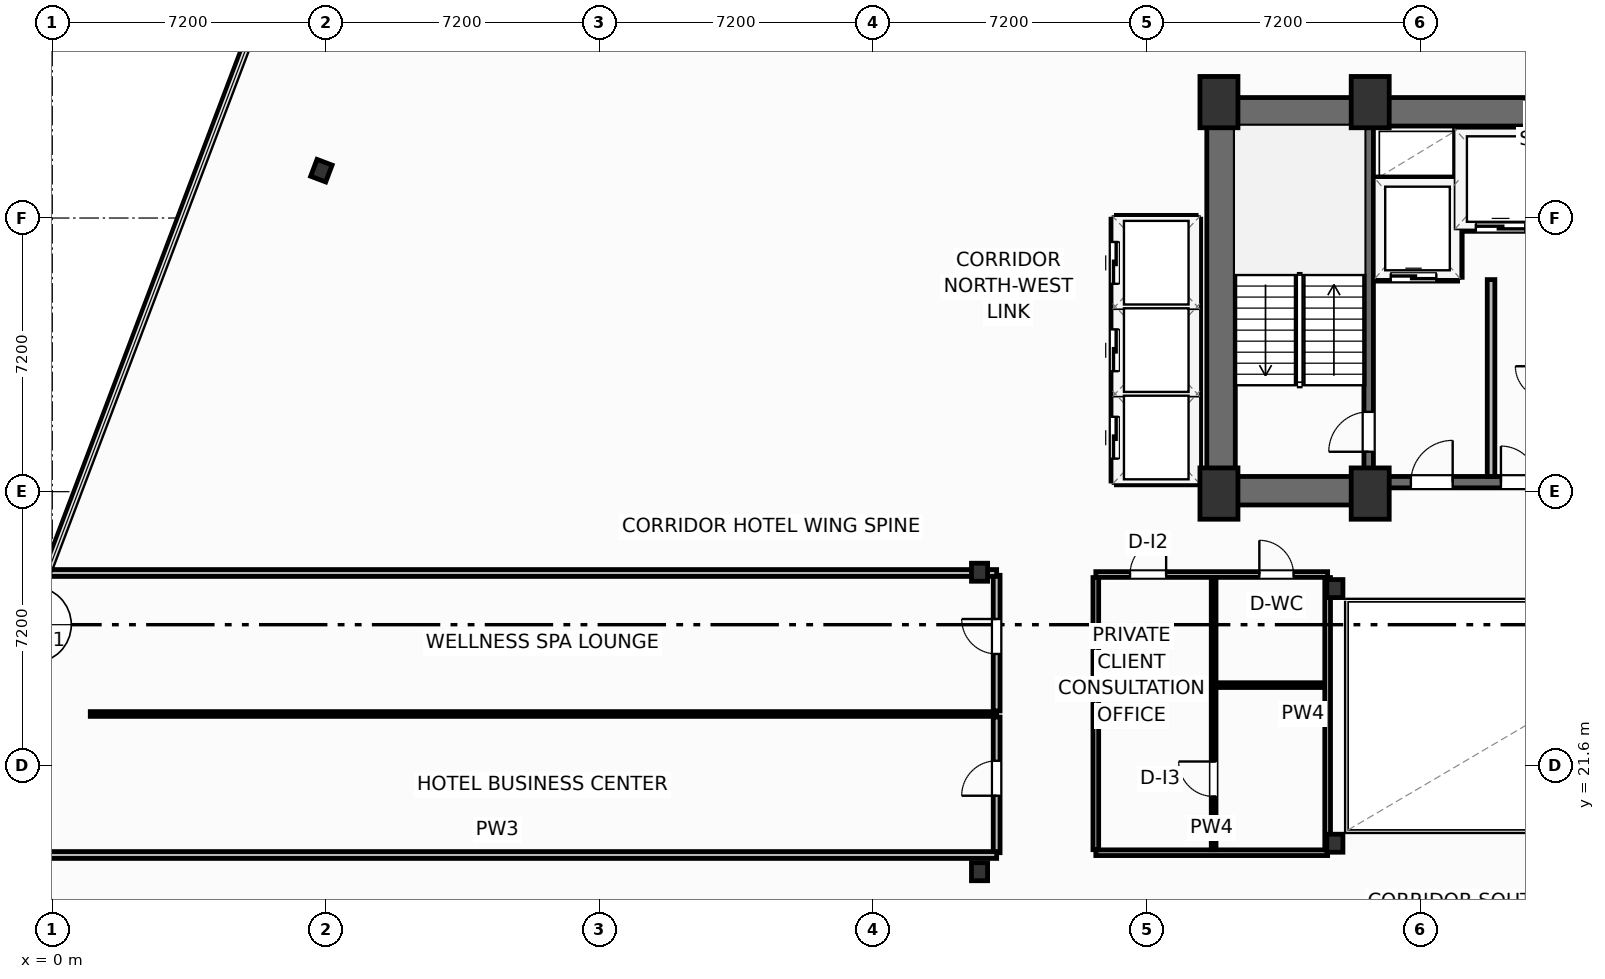
"""IFC4 building model, lengths in metres.
Left out: names, types, materials, properties, quantities, classifications, styles, units other than length and angle.
Written with IfcOpenShell. Run it as: python <this file> out.ifc"""

import sys

from ifc_helpers import new_model, si_unit, direction, frame, frame_2d, origin, origin_2d, place, context, subcontext, project, spatial, rectangle, i_section, extrude, element, fill, save


model = new_model("IFC4")
c1 = context("Model", 3, precision=1e-05, world=origin(), true_north=direction((0.0, 1.0)))
c2 = subcontext(c1, "Body", "Model", "MODEL_VIEW")
j1 = project(units=[si_unit("LENGTHUNIT", "METRE"), si_unit("PLANEANGLEUNIT", "RADIAN")], contexts=[c1])
p1 = place(None, origin())
s1 = spatial("IfcSite", under=j1, at=p1, CompositionType="ELEMENT")
p2 = place(p1, origin())
s2 = spatial("IfcBuilding", under=s1, at=p2, CompositionType="ELEMENT")
p3 = place(p2, frame((0.0, 0.0, 76.2)))
s3 = spatial("IfcBuildingStorey", under=s2, at=p3, CompositionType="ELEMENT", Elevation=76.2)
for number, where, z_axis, x_axis in (
    (1, (30.7, 28.75, 0.0), (0.0, 0.0, 1.0), (1.0, 0.0, 0.0)),
    (2, (34.68, 28.75, 0.0), (0.0, 0.0, 1.0), (1.0, 0.0, 0.0)),
    (3, (30.7, 39.05, 0.0), (0.0, 0.0, 1.0), (1.0, 0.0, 0.0)),
    (4, (34.68, 39.05, 0.0), (0.0, 0.0, 1.0), (1.0, 0.0, 0.0)),
):
    element("IfcColumn", number, at=place(p3, frame(where, z_axis=z_axis, x_axis=x_axis)), inside=s3, PredefinedType="COLUMN", context=c2, shape_type="SweptSolid", body=[
        extrude(rectangle(XDim=1.0, YDim=1.35, at=origin_2d()), origin(), (0.0, 0.0, 1.0), 3.7),
    ])
for number, where, z_axis, x_axis in (
    (5, (33.75, 19.55, 0.0), (0.0, 0.0, 1.0), (1.0, 0.0, 0.0)),
    (6, (33.75, 26.25, 0.0), (0.0, 0.0, 1.0), (1.0, 0.0, 0.0)),
    (7, (24.4, 18.8, 0.0), (0.0, 0.0, 1.0), (1.0, 0.0, 0.0)),
    (8, (24.4, 26.68, 0.0), (0.0, 0.0, 1.0), (1.0, 0.0, 0.0)),
):
    element("IfcColumn", number, at=place(p3, frame(where, z_axis=z_axis, x_axis=x_axis)), inside=s3, PredefinedType="COLUMN", context=c2, shape_type="SweptSolid", body=[
        extrude(i_section(OverallWidth=0.424, OverallDepth=0.474, WebThickness=0.048, FlangeThickness=0.077, FilletRadius=0.025, at=origin_2d()), origin(), (0.0, 0.0, 1.0), 3.7),
    ])
p4 = place(p3, frame((30.38, 38.795, 0.0), z_axis=(0.0, 0.0, 1.0), x_axis=(1.0, 0.0, 0.0)))
e9 = element("IfcWall", 9, at=p4, inside=s3, PredefinedType="SHEAR", context=c2, shape_type="SweptSolid", body=[
    extrude(rectangle(XDim=17.64, YDim=0.75, at=frame_2d((8.82, 0.0))), origin(), (0.0, 0.0, 1.0), 3.45),
])
p5 = place(p3, frame((30.755, 29.2, 0.0), z_axis=(0.0, 0.0, 1.0), x_axis=(0.0, 1.0, 0.0)))
e10 = element("IfcWall", 10, at=p5, inside=s3, PredefinedType="SHEAR", context=c2, shape_type="SweptSolid", body=[
    extrude(rectangle(XDim=9.22, YDim=0.75, at=frame_2d((4.61, 0.0))), origin(), (0.0, 0.0, 1.0), 3.45),
])
p6 = place(p3, frame((30.38, 28.825, 0.0), z_axis=(0.0, 0.0, 1.0), x_axis=(1.0, 0.0, 0.0)))
e11 = element("IfcWall", 11, at=p6, inside=s3, PredefinedType="SHEAR", context=c2, shape_type="SweptSolid", body=[
    extrude(rectangle(XDim=4.42, YDim=0.75, at=frame_2d((2.21, 0.0))), origin(), (0.0, 0.0, 1.0), 3.45),
])
p7 = place(p3, frame((34.8, 29.05, 0.0), z_axis=(0.0, 0.0, 1.0), x_axis=(1.0, 0.0, 0.0)))
e12 = element("IfcWall", 12, at=p7, inside=s3, PredefinedType="SHEAR", context=c2, shape_type="SweptSolid", body=[
    extrude(rectangle(XDim=8.8, YDim=0.3, at=frame_2d((4.4, 0.0))), origin(), (0.0, 0.0, 1.0), 3.45),
])
p8 = place(p7, frame((0.95, 0.0, 0.0)))
e13 = element("IfcOpeningElement", 13, at=p8, cuts=e12, PredefinedType="OPENING", context=c2, shape_type="SweptSolid", body=[
    extrude(rectangle(XDim=1.1, YDim=2.15, at=frame_2d((0.55, 1.075))), frame((0.0, 0.16, 0.0), z_axis=(0.0, -1.0, 0.0), x_axis=(1.0, 0.0, 0.0)), (0.0, 0.0, 1.0), 0.32),
])
p9 = place(p7, frame((6.75, 0.0, 0.0)))
e14 = element("IfcOpeningElement", 14, at=p9, cuts=e12, PredefinedType="OPENING", context=c2, shape_type="SweptSolid", body=[
    extrude(rectangle(XDim=1.1, YDim=2.15, at=frame_2d((0.55, 1.075))), frame((0.0, 0.16, 0.0), z_axis=(0.0, -1.0, 0.0), x_axis=(1.0, 0.0, 0.0)), (0.0, 0.0, 1.0), 0.32),
])
p10 = place(p7, frame((3.32, 0.0, 0.0)))
e15 = element("IfcOpeningElement", 15, at=p10, cuts=e12, PredefinedType="OPENING", context=c2, shape_type="SweptSolid", body=[
    extrude(rectangle(XDim=0.95, YDim=2.15, at=frame_2d((0.475, 1.075))), frame((0.0, 0.16, 0.0), z_axis=(0.0, -1.0, 0.0), x_axis=(1.0, 0.0, 0.0)), (0.0, 0.0, 1.0), 0.32),
])
p11 = place(p3, frame((34.64, 29.2, 0.0), z_axis=(0.0, 0.0, 1.0), x_axis=(0.0, 1.0, 0.0)))
e16 = element("IfcWall", 16, at=p11, inside=s3, PredefinedType="SHEAR", context=c2, shape_type="SweptSolid", body=[
    extrude(rectangle(XDim=9.22, YDim=0.25, at=frame_2d((4.61, 0.0))), origin(), (0.0, 0.0, 1.0), 3.45),
])
p12 = place(p11, frame((0.65, 0.0, 0.0)))
e17 = element("IfcOpeningElement", 17, at=p12, cuts=e16, PredefinedType="OPENING", context=c2, shape_type="SweptSolid", body=[
    extrude(rectangle(XDim=1.05, YDim=2.15, at=frame_2d((0.525, 1.075))), frame((0.0, 0.135, 0.0), z_axis=(0.0, -1.0, 0.0), x_axis=(1.0, 0.0, 0.0)), (0.0, 0.0, 1.0), 0.27),
])
p13 = place(p3, frame((7.081, 37.246, 0.0), z_axis=(0.0, 0.0, 1.0), x_axis=(0.935221751401, -0.354062530786, 0.0)))
e18 = element("IfcColumn", 18, at=p13, inside=s3, PredefinedType="COLUMN", context=c2, shape_type="SweptSolid", body=[
    extrude(i_section(OverallWidth=0.424, OverallDepth=0.474, WebThickness=0.048, FlangeThickness=0.077, FilletRadius=0.025, at=origin_2d()), origin(), (0.0, 0.0, 1.0), 3.7),
])
p14 = place(p3, frame((24.85, 19.3, 0.0), z_axis=(0.0, 0.0, 1.0), x_axis=(0.0, 1.0, 0.0)))
e19 = element("IfcWall", 19, at=p14, inside=s3, PredefinedType="PARTITIONING", context=c2, shape_type="SweptSolid", body=[
    extrude(rectangle(XDim=3.57, YDim=0.18, at=frame_2d((1.785, 0.0))), origin(), (0.0, 0.0, 1.0), 3.45),
])
p15 = place(p14, frame((1.5, 0.0, 0.0)))
e20 = element("IfcOpeningElement", 20, at=p15, cuts=e19, PredefinedType="OPENING", context=c2, shape_type="SweptSolid", body=[
    extrude(rectangle(XDim=0.92, YDim=2.05, at=frame_2d((0.46, 1.025))), frame((0.0, 0.1, 0.0), z_axis=(0.0, -1.0, 0.0), x_axis=(1.0, 0.0, 0.0)), (0.0, 0.0, 1.0), 0.2),
])
p16 = place(p3, frame((24.85, 23.03, 0.0), z_axis=(0.0, 0.0, 1.0), x_axis=(0.0, 1.0, 0.0)))
e21 = element("IfcWall", 21, at=p16, inside=s3, PredefinedType="PARTITIONING", context=c2, shape_type="SweptSolid", body=[
    extrude(rectangle(XDim=3.57, YDim=0.18, at=frame_2d((1.785, 0.0))), origin(), (0.0, 0.0, 1.0), 3.45),
])
p17 = place(p16, frame((1.5, 0.0, 0.0)))
e22 = element("IfcOpeningElement", 22, at=p17, cuts=e21, PredefinedType="OPENING", context=c2, shape_type="SweptSolid", body=[
    extrude(rectangle(XDim=0.92, YDim=2.05, at=frame_2d((0.46, 1.025))), frame((0.0, 0.1, 0.0), z_axis=(0.0, -1.0, 0.0), x_axis=(1.0, 0.0, 0.0)), (0.0, 0.0, 1.0), 0.2),
])
p18 = place(p3, frame((1.0, 22.95, 0.0), z_axis=(0.0, 0.0, 1.0), x_axis=(1.0, 0.0, 0.0)))
e23 = element("IfcWall", 23, at=p18, inside=s3, PredefinedType="PARTITIONING", context=c2, shape_type="SweptSolid", body=[
    extrude(rectangle(XDim=23.85, YDim=0.125, at=frame_2d((11.925, 0.0))), origin(), (0.0, 0.0, 1.0), 3.45),
])
p19 = place(p3, frame((-1.432, 19.24, 0.0), z_axis=(0.0, 0.0, 1.0), x_axis=(1.0, 0.0, 0.0)))
e24 = element("IfcWall", 24, at=p19, inside=s3, PredefinedType="PARTITIONING", context=c2, shape_type="SweptSolid", body=[
    extrude(rectangle(XDim=26.282, YDim=0.18, at=frame_2d((13.141, 0.0))), origin(), (0.0, 0.0, 1.0), 3.45),
])
p20 = place(p3, frame((-0.086, 26.66, 0.0), z_axis=(0.0, 0.0, 1.0), x_axis=(1.0, 0.0, 0.0)))
e25 = element("IfcWall", 25, at=p20, inside=s3, PredefinedType="PARTITIONING", context=c2, shape_type="SweptSolid", body=[
    extrude(rectangle(XDim=24.936, YDim=0.18, at=frame_2d((12.468, 0.0))), origin(), (0.0, 0.0, 1.0), 2.662),
])
p21 = place(p3, frame((37.86, 29.2, 0.0), z_axis=(0.0, 0.0, 1.0), x_axis=(0.0, 1.0, 0.0)))
e26 = element("IfcWall", 26, at=p21, inside=s3, PredefinedType="PARTITIONING", context=c2, shape_type="SweptSolid", body=[
    extrude(rectangle(XDim=5.18, YDim=0.2, at=frame_2d((2.59, 0.0))), origin(), (0.0, 0.0, 1.0), 3.45),
])
p22 = place(p3, frame((34.8, 34.44, 0.0), z_axis=(0.0, 0.0, 1.0), x_axis=(1.0, 0.0, 0.0)))
e27 = element("IfcWall", 27, at=p22, inside=s3, PredefinedType="PARTITIONING", context=c2, shape_type="SweptSolid", body=[
    extrude(rectangle(XDim=2.18, YDim=0.2, at=frame_2d((1.09, 0.0))), origin(), (0.0, 0.0, 1.0), 3.45),
])
p23 = place(p22, frame((0.42, 0.0, 0.0)))
e28 = element("IfcOpeningElement", 28, at=p23, cuts=e27, PredefinedType="OPENING", context=c2, shape_type="SweptSolid", body=[
    extrude(rectangle(XDim=1.2, YDim=2.2, at=frame_2d((0.6, 1.1))), frame((0.0, 0.11, 0.0), z_axis=(0.0, -1.0, 0.0), x_axis=(1.0, 0.0, 0.0)), (0.0, 0.0, 1.0), 0.22),
])
p24 = place(p3, frame((34.8, 36.98, 0.0), z_axis=(0.0, 0.0, 1.0), x_axis=(1.0, 0.0, 0.0)))
e29 = element("IfcWall", 29, at=p24, inside=s3, PredefinedType="PARTITIONING", context=c2, shape_type="SweptSolid", body=[
    extrude(rectangle(XDim=2.18, YDim=0.2, at=frame_2d((1.09, 0.0))), origin(), (0.0, 0.0, 1.0), 3.45),
])
p25 = place(p3, frame((37.0, 34.44, 0.0), z_axis=(0.0, 0.0, 1.0), x_axis=(0.0, 1.0, 0.0)))
e30 = element("IfcWall", 30, at=p25, inside=s3, PredefinedType="PARTITIONING", context=c2, shape_type="SweptSolid", body=[
    extrude(rectangle(XDim=3.9, YDim=0.2, at=frame_2d((1.95, 0.0))), origin(), (0.0, 0.0, 1.0), 3.45),
])
p26 = place(p3, frame((37.06, 35.75, 0.0), z_axis=(0.0, 0.0, 1.0), x_axis=(1.0, 0.0, 0.0)))
e31 = element("IfcWall", 31, at=p26, inside=s3, PredefinedType="PARTITIONING", context=c2, shape_type="SweptSolid", body=[
    extrude(rectangle(XDim=2.12, YDim=0.2, at=frame_2d((1.06, 0.0))), origin(), (0.0, 0.0, 1.0), 3.45),
])
p27 = place(p26, frame((0.4, 0.0, 0.0)))
e32 = element("IfcOpeningElement", 32, at=p27, cuts=e31, PredefinedType="OPENING", context=c2, shape_type="SweptSolid", body=[
    extrude(rectangle(XDim=1.3, YDim=2.2, at=frame_2d((0.65, 1.1))), frame((0.0, 0.11, 0.0), z_axis=(0.0, -1.0, 0.0), x_axis=(1.0, 0.0, 0.0)), (0.0, 0.0, 1.0), 0.22),
])
p28 = place(p3, frame((27.46, 26.62, 0.0), z_axis=(0.0, 0.0, 1.0), x_axis=(1.0, 0.0, 0.0)))
e33 = element("IfcWall", 33, at=p28, inside=s3, PredefinedType="PARTITIONING", context=c2, shape_type="SweptSolid", body=[
    extrude(rectangle(XDim=6.1, YDim=0.15, at=frame_2d((3.05, 0.0))), origin(), (0.0, 0.0, 1.0), 2.662),
])
p29 = place(p28, frame((0.9, 0.0, 0.0)))
e34 = element("IfcOpeningElement", 34, at=p29, cuts=e33, PredefinedType="OPENING", context=c2, shape_type="SweptSolid", body=[
    extrude(rectangle(XDim=0.95, YDim=2.05, at=frame_2d((0.475, 1.025))), frame((0.0, 0.085, 0.0), z_axis=(0.0, -1.0, 0.0), x_axis=(1.0, 0.0, 0.0)), (0.0, 0.0, 1.0), 0.17),
])
p30 = place(p28, frame((4.303, 0.0, 0.0)))
e35 = element("IfcOpeningElement", 35, at=p30, cuts=e33, PredefinedType="OPENING", context=c2, shape_type="SweptSolid", body=[
    extrude(rectangle(XDim=0.9, YDim=2.05, at=frame_2d((0.45, 1.025))), frame((0.0, 0.085, 0.0), z_axis=(0.0, -1.0, 0.0), x_axis=(1.0, 0.0, 0.0)), (0.0, 0.0, 1.0), 0.17),
])
p31 = place(p3, frame((27.46, 19.3, 0.0), z_axis=(0.0, 0.0, 1.0), x_axis=(1.0, 0.0, 0.0)))
e36 = element("IfcWall", 36, at=p31, inside=s3, PredefinedType="PARTITIONING", context=c2, shape_type="SweptSolid", body=[
    extrude(rectangle(XDim=6.1, YDim=0.15, at=frame_2d((3.05, 0.0))), origin(), (0.0, 0.0, 1.0), 2.662),
])
p32 = place(p3, frame((30.56, 19.38, 0.0), z_axis=(0.0, 0.0, 1.0), x_axis=(0.0, 1.0, 0.0)))
e37 = element("IfcWall", 37, at=p32, inside=s3, PredefinedType="PARTITIONING", context=c2, shape_type="SweptSolid", body=[
    extrude(rectangle(XDim=7.16, YDim=0.125, at=frame_2d((3.58, 0.0))), origin(), (0.0, 0.0, 1.0), 3.45),
])
p33 = place(p32, frame((1.4, 0.0, 0.0)))
e38 = element("IfcOpeningElement", 38, at=p33, cuts=e37, PredefinedType="OPENING", context=c2, shape_type="SweptSolid", body=[
    extrude(rectangle(XDim=0.92, YDim=2.05, at=frame_2d((0.46, 1.025))), frame((0.0, 0.073, 0.0), z_axis=(0.0, -1.0, 0.0), x_axis=(1.0, 0.0, 0.0)), (0.0, 0.0, 1.0), 0.145),
])
p34 = place(p3, frame((30.64, 23.71, 0.0), z_axis=(0.0, 0.0, 1.0), x_axis=(1.0, 0.0, 0.0)))
e39 = element("IfcWall", 39, at=p34, inside=s3, PredefinedType="PARTITIONING", context=c2, shape_type="SweptSolid", body=[
    extrude(rectangle(XDim=2.88, YDim=0.125, at=frame_2d((1.44, 0.0))), origin(), (0.0, 0.0, 1.0), 3.45),
])
p35 = place(p3, frame((27.46, 19.38, 0.0), z_axis=(0.0, 0.0, 1.0), x_axis=(0.0, 1.0, 0.0)))
e40 = element("IfcWall", 40, at=p35, inside=s3, PredefinedType="PARTITIONING", context=c2, shape_type="SweptSolid", body=[
    extrude(rectangle(XDim=7.16, YDim=0.15, at=frame_2d((3.58, 0.0))), origin(), (0.0, 0.0, 1.0), 3.45),
])
p36 = place(p3, frame((33.56, 19.38, 0.0), z_axis=(0.0, 0.0, 1.0), x_axis=(0.0, 1.0, 0.0)))
e41 = element("IfcWall", 41, at=p36, inside=s3, PredefinedType="PARTITIONING", context=c2, shape_type="SweptSolid", body=[
    extrude(rectangle(XDim=7.16, YDim=0.15, at=frame_2d((3.58, 0.0))), origin(), (0.0, 0.0, 1.0), 2.824),
])
for number, where, z_axis, x_axis in (
    (42, (28.02, 31.375, 0.0), (0.0, 0.0, 1.0), (1.0, 0.0, 0.0)),
    (43, (28.02, 33.675, 0.0), (0.0, 0.0, 1.0), (1.0, 0.0, 0.0)),
):
    element("IfcWall", number, at=place(p3, frame(where, z_axis=z_axis, x_axis=x_axis)), inside=s3, PredefinedType="PARTITIONING", context=c2, shape_type="SweptSolid", body=[
        extrude(rectangle(XDim=2.06, YDim=0.2, at=frame_2d((1.03, 0.0))), origin(), (0.0, 0.0, 1.0), 3.45),
    ])
for number, where, z_axis, x_axis in (
    (44, (28.0, 29.08, 0.0), (0.0, 0.0, 1.0), (1.0, 0.0, 0.0)),
    (45, (28.0, 35.97, 0.0), (0.0, 0.0, 1.0), (1.0, 0.0, 0.0)),
):
    element("IfcWall", number, at=place(p3, frame(where, z_axis=z_axis, x_axis=x_axis)), inside=s3, PredefinedType="PARTITIONING", context=c2, shape_type="SweptSolid", body=[
        extrude(rectangle(XDim=2.1, YDim=0.2, at=frame_2d((1.05, 0.0))), origin(), (0.0, 0.0, 1.0), 3.45),
    ])
p37 = place(p3, frame((30.12, 29.08, 0.0), z_axis=(0.0, 0.0, 1.0), x_axis=(0.0, 1.0, 0.0)))
e46 = element("IfcWall", 46, at=p37, inside=s3, PredefinedType="PARTITIONING", context=c2, shape_type="SweptSolid", body=[
    extrude(rectangle(XDim=6.89, YDim=0.2, at=frame_2d((3.445, 0.0))), origin(), (0.0, 0.0, 1.0), 3.45),
])
p38 = place(p3, frame((27.96, 29.08, 0.0), z_axis=(0.0, 0.0, 1.0), x_axis=(0.0, 1.0, 0.0)))
e47 = element("IfcWall", 47, at=p38, inside=s3, PredefinedType="PARTITIONING", context=c2, shape_type="SweptSolid", body=[
    extrude(rectangle(XDim=6.89, YDim=0.2, at=frame_2d((3.445, 0.0))), origin(), (0.0, 0.0, 1.0), 3.45),
])
p39 = place(p38, frame((0.59, 0.0, 0.0)))
e48 = element("IfcOpeningElement", 48, at=p39, cuts=e47, PredefinedType="OPENING", context=c2, shape_type="SweptSolid", body=[
    extrude(rectangle(XDim=1.1, YDim=2.15, at=frame_2d((0.55, 1.075))), frame((0.0, 0.11, 0.0), z_axis=(0.0, -1.0, 0.0), x_axis=(1.0, 0.0, 0.0)), (0.0, 0.0, 1.0), 0.22),
])
p40 = place(p38, frame((2.89, 0.0, 0.0)))
e49 = element("IfcOpeningElement", 49, at=p40, cuts=e47, PredefinedType="OPENING", context=c2, shape_type="SweptSolid", body=[
    extrude(rectangle(XDim=1.1, YDim=2.15, at=frame_2d((0.55, 1.075))), frame((0.0, 0.11, 0.0), z_axis=(0.0, -1.0, 0.0), x_axis=(1.0, 0.0, 0.0)), (0.0, 0.0, 1.0), 0.22),
])
p41 = place(p38, frame((5.19, 0.0, 0.0)))
e50 = element("IfcOpeningElement", 50, at=p41, cuts=e47, PredefinedType="OPENING", context=c2, shape_type="SweptSolid", body=[
    extrude(rectangle(XDim=1.1, YDim=2.15, at=frame_2d((0.55, 1.075))), frame((0.0, 0.11, 0.0), z_axis=(0.0, -1.0, 0.0), x_axis=(1.0, 0.0, 0.0)), (0.0, 0.0, 1.0), 0.22),
])
p42 = place(p15, origin())
e51 = element("IfcDoor", 51, at=p42, inside=s3, OperationType="SINGLE_SWING_LEFT", PredefinedType="DOOR", context=c2, shape_type="SweptSolid", body=[
    extrude(rectangle(XDim=0.92, YDim=2.05, at=frame_2d((0.46, 1.025))), frame((0.0, 0.025, 0.0), z_axis=(0.0, -1.0, 0.0), x_axis=(1.0, 0.0, 0.0)), (0.0, 0.0, 1.0), 0.05),
])
fill(e20, e51)
p43 = place(p17, origin())
e52 = element("IfcDoor", 52, at=p43, inside=s3, OperationType="SINGLE_SWING_RIGHT", PredefinedType="DOOR", context=c2, shape_type="SweptSolid", body=[
    extrude(rectangle(XDim=0.92, YDim=2.05, at=frame_2d((0.46, 1.025))), frame((0.0, 0.025, 0.0), z_axis=(0.0, -1.0, 0.0), x_axis=(1.0, 0.0, 0.0)), (0.0, 0.0, 1.0), 0.05),
])
fill(e22, e52)
p44 = place(p12, origin())
e53 = element("IfcDoor", 53, at=p44, inside=s3, OperationType="SINGLE_SWING_LEFT", PredefinedType="DOOR", context=c2, shape_type="SweptSolid", body=[
    extrude(rectangle(XDim=1.05, YDim=2.15, at=frame_2d((0.525, 1.075))), frame((0.0, 0.025, 0.0), z_axis=(0.0, -1.0, 0.0), x_axis=(1.0, 0.0, 0.0)), (0.0, 0.0, 1.0), 0.05),
])
fill(e17, e53)
p45 = place(p8, origin())
e54 = element("IfcDoor", 54, at=p45, inside=s3, OperationType="SINGLE_SWING_RIGHT", PredefinedType="DOOR", context=c2, shape_type="SweptSolid", body=[
    extrude(rectangle(XDim=1.1, YDim=2.15, at=frame_2d((0.55, 1.075))), frame((0.0, 0.025, 0.0), z_axis=(0.0, -1.0, 0.0), x_axis=(1.0, 0.0, 0.0)), (0.0, 0.0, 1.0), 0.05),
])
fill(e13, e54)
p46 = place(p23, origin())
e55 = element("IfcDoor", 55, at=p46, inside=s3, OperationType="SLIDING_TO_LEFT", PredefinedType="DOOR", context=c2, shape_type="SweptSolid", body=[
    extrude(rectangle(XDim=1.2, YDim=2.2, at=frame_2d((0.6, 1.1))), frame((0.0, 0.025, 0.0), z_axis=(0.0, -1.0, 0.0), x_axis=(1.0, 0.0, 0.0)), (0.0, 0.0, 1.0), 0.05),
])
fill(e28, e55)
p47 = place(p27, origin())
e56 = element("IfcDoor", 56, at=p47, inside=s3, OperationType="SLIDING_TO_LEFT", PredefinedType="DOOR", context=c2, shape_type="SweptSolid", body=[
    extrude(rectangle(XDim=1.3, YDim=2.2, at=frame_2d((0.65, 1.1))), frame((0.0, 0.025, 0.0), z_axis=(0.0, -1.0, 0.0), x_axis=(1.0, 0.0, 0.0)), (0.0, 0.0, 1.0), 0.05),
])
fill(e32, e56)
p48 = place(p10, origin())
e57 = element("IfcDoor", 57, at=p48, inside=s3, OperationType="SINGLE_SWING_LEFT", PredefinedType="DOOR", context=c2, shape_type="SweptSolid", body=[
    extrude(rectangle(XDim=0.95, YDim=2.15, at=frame_2d((0.475, 1.075))), frame((0.0, 0.025, 0.0), z_axis=(0.0, -1.0, 0.0), x_axis=(1.0, 0.0, 0.0)), (0.0, 0.0, 1.0), 0.05),
])
fill(e15, e57)
p49 = place(p29, origin())
e58 = element("IfcDoor", 58, at=p49, inside=s3, OperationType="SINGLE_SWING_RIGHT", PredefinedType="DOOR", context=c2, shape_type="SweptSolid", body=[
    extrude(rectangle(XDim=0.95, YDim=2.05, at=frame_2d((0.475, 1.025))), frame((0.0, 0.025, 0.0), z_axis=(0.0, -1.0, 0.0), x_axis=(1.0, 0.0, 0.0)), (0.0, 0.0, 1.0), 0.05),
])
fill(e34, e58)
p50 = place(p30, origin())
e59 = element("IfcDoor", 59, at=p50, inside=s3, OperationType="SINGLE_SWING_LEFT", PredefinedType="DOOR", context=c2, shape_type="SweptSolid", body=[
    extrude(rectangle(XDim=0.9, YDim=2.05, at=frame_2d((0.45, 1.025))), frame((0.0, 0.025, 0.0), z_axis=(0.0, -1.0, 0.0), x_axis=(1.0, 0.0, 0.0)), (0.0, 0.0, 1.0), 0.05),
])
fill(e35, e59)
p51 = place(p33, origin())
e60 = element("IfcDoor", 60, at=p51, inside=s3, OperationType="SINGLE_SWING_RIGHT", PredefinedType="DOOR", context=c2, shape_type="SweptSolid", body=[
    extrude(rectangle(XDim=0.92, YDim=2.05, at=frame_2d((0.46, 1.025))), frame((0.0, 0.025, 0.0), z_axis=(0.0, -1.0, 0.0), x_axis=(1.0, 0.0, 0.0)), (0.0, 0.0, 1.0), 0.05),
])
fill(e38, e60)
p52 = place(p39, origin())
e61 = element("IfcDoor", 61, at=p52, inside=s3, OperationType="SLIDING_TO_LEFT", PredefinedType="DOOR", context=c2, shape_type="SweptSolid", body=[
    extrude(rectangle(XDim=1.1, YDim=2.15, at=frame_2d((0.55, 1.075))), frame((0.0, 0.025, 0.0), z_axis=(0.0, -1.0, 0.0), x_axis=(1.0, 0.0, 0.0)), (0.0, 0.0, 1.0), 0.05),
])
fill(e48, e61)
p53 = place(p40, origin())
e62 = element("IfcDoor", 62, at=p53, inside=s3, OperationType="SLIDING_TO_LEFT", PredefinedType="DOOR", context=c2, shape_type="SweptSolid", body=[
    extrude(rectangle(XDim=1.1, YDim=2.15, at=frame_2d((0.55, 1.075))), frame((0.0, 0.025, 0.0), z_axis=(0.0, -1.0, 0.0), x_axis=(1.0, 0.0, 0.0)), (0.0, 0.0, 1.0), 0.05),
])
fill(e49, e62)
p54 = place(p41, origin())
e63 = element("IfcDoor", 63, at=p54, inside=s3, OperationType="SLIDING_TO_LEFT", PredefinedType="DOOR", context=c2, shape_type="SweptSolid", body=[
    extrude(rectangle(XDim=1.1, YDim=2.15, at=frame_2d((0.55, 1.075))), frame((0.0, 0.025, 0.0), z_axis=(0.0, -1.0, 0.0), x_axis=(1.0, 0.0, 0.0)), (0.0, 0.0, 1.0), 0.05),
])
fill(e50, e63)
save(model, sys.argv[1])
